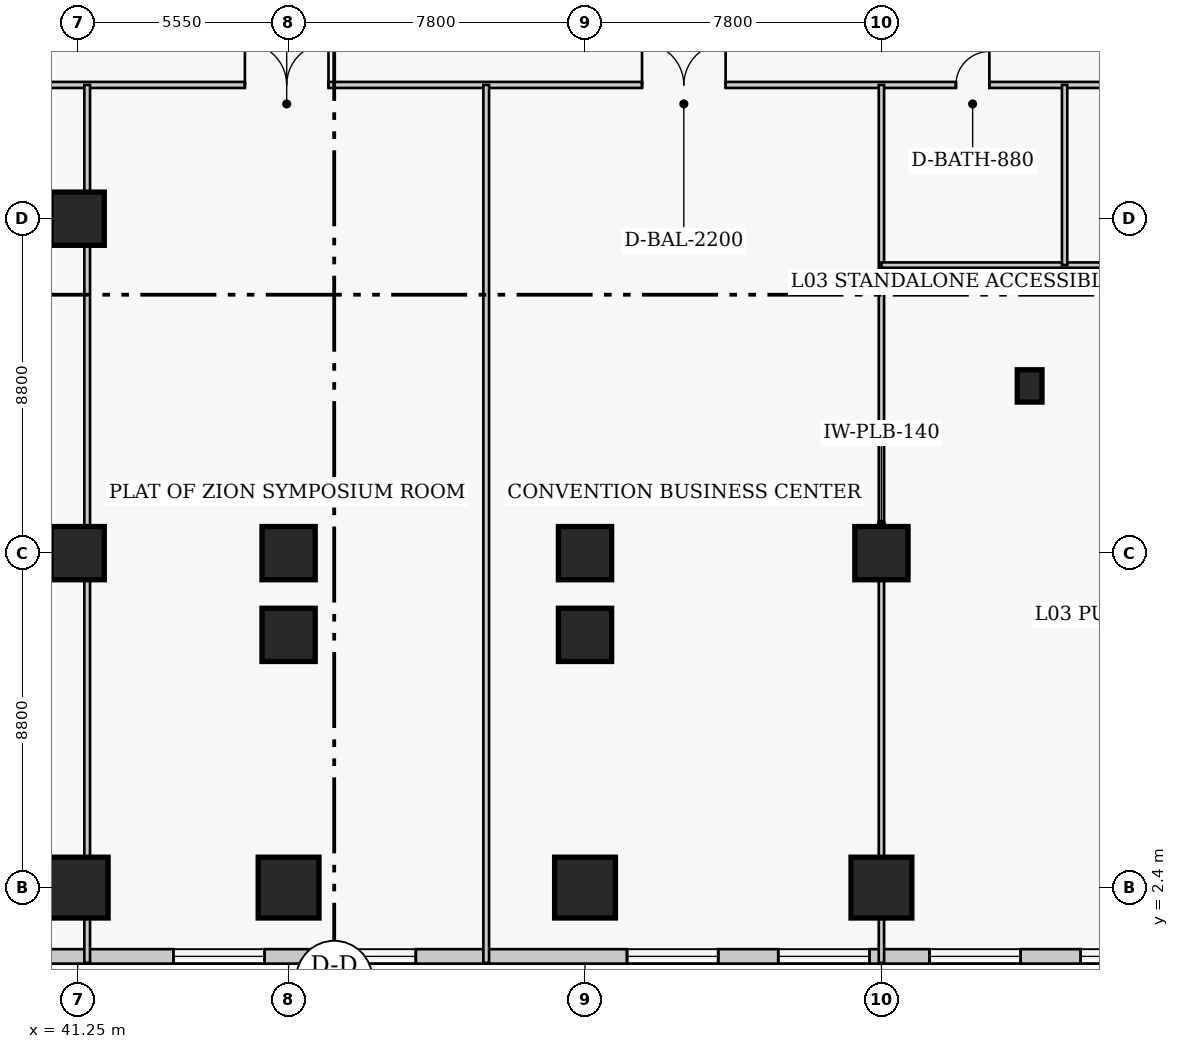
"""IFC4 building model, lengths in metres.
Left out: names, types, materials, properties, quantities, classifications, styles, units other than length and angle.
Written with IfcOpenShell. Run it as: python <this file> out.ifc"""

import sys

from ifc_helpers import new_model, si_unit, direction, frame, frame_2d, origin, origin_2d, place, context, subcontext, project, spatial, rectangle, extrude, element, fill, save


model = new_model("IFC4")
c1 = context("Model", 3, precision=1e-05, world=origin(), true_north=direction((0.0, 1.0)))
c2 = subcontext(c1, "Body", "Model", "MODEL_VIEW")
j1 = project(units=[si_unit("LENGTHUNIT", "METRE"), si_unit("PLANEANGLEUNIT", "RADIAN")], contexts=[c1])
p1 = place(None, origin())
s1 = spatial("IfcSite", under=j1, at=p1, CompositionType="ELEMENT")
p2 = place(p1, origin())
s2 = spatial("IfcBuilding", under=s1, at=p2, CompositionType="ELEMENT")
p3 = place(p2, frame((0.0, 0.0, 15.8)))
s3 = spatial("IfcBuildingStorey", under=s2, at=p3, CompositionType="ELEMENT", Elevation=15.8)
p4 = place(p3, frame((41.25, 2.4, 0.0), z_axis=(0.0, 0.0, 1.0), x_axis=(1.0, 0.0, 0.0)))
e1 = element("IfcColumn", 1, at=p4, inside=s3, PredefinedType="COLUMN", context=c2, shape_type="SweptSolid", body=[
    extrude(rectangle(XDim=1.6, YDim=1.6, at=origin_2d()), origin(), (0.0, 0.0, 1.0), 5.0),
])
for number, where, z_axis, x_axis in (
    (2, (41.25, 11.2, 0.0), (0.0, 0.0, 1.0), (1.0, 0.0, 0.0)),
    (3, (41.25, 20.0, 0.0), (0.0, 0.0, 1.0), (1.0, 0.0, 0.0)),
):
    element("IfcColumn", number, at=place(p3, frame(where, z_axis=z_axis, x_axis=x_axis)), inside=s3, PredefinedType="COLUMN", context=c2, shape_type="SweptSolid", body=[
        extrude(rectangle(XDim=1.4, YDim=1.4, at=origin_2d()), origin(), (0.0, 0.0, 1.0), 5.0),
    ])
p5 = place(p3, frame((46.8, 2.4, 0.0), z_axis=(0.0, 0.0, 1.0), x_axis=(1.0, 0.0, 0.0)))
e4 = element("IfcColumn", 4, at=p5, inside=s3, PredefinedType="COLUMN", context=c2, shape_type="SweptSolid", body=[
    extrude(rectangle(XDim=1.6, YDim=1.6, at=origin_2d()), origin(), (0.0, 0.0, 1.0), 5.0),
])
p6 = place(p3, frame((46.8, 11.2, 0.0), z_axis=(0.0, 0.0, 1.0), x_axis=(1.0, 0.0, 0.0)))
e5 = element("IfcColumn", 5, at=p6, inside=s3, PredefinedType="COLUMN", context=c2, shape_type="SweptSolid", body=[
    extrude(rectangle(XDim=1.4, YDim=1.4, at=origin_2d()), origin(), (0.0, 0.0, 1.0), 5.0),
])
p7 = place(p3, frame((54.6, 2.4, 0.0), z_axis=(0.0, 0.0, 1.0), x_axis=(1.0, 0.0, 0.0)))
e6 = element("IfcColumn", 6, at=p7, inside=s3, PredefinedType="COLUMN", context=c2, shape_type="SweptSolid", body=[
    extrude(rectangle(XDim=1.6, YDim=1.6, at=origin_2d()), origin(), (0.0, 0.0, 1.0), 5.0),
])
p8 = place(p3, frame((54.6, 11.2, 0.0), z_axis=(0.0, 0.0, 1.0), x_axis=(1.0, 0.0, 0.0)))
e7 = element("IfcColumn", 7, at=p8, inside=s3, PredefinedType="COLUMN", context=c2, shape_type="SweptSolid", body=[
    extrude(rectangle(XDim=1.4, YDim=1.4, at=origin_2d()), origin(), (0.0, 0.0, 1.0), 5.0),
])
p9 = place(p3, frame((62.4, 2.4, 0.0), z_axis=(0.0, 0.0, 1.0), x_axis=(1.0, 0.0, 0.0)))
e8 = element("IfcColumn", 8, at=p9, inside=s3, PredefinedType="COLUMN", context=c2, shape_type="SweptSolid", body=[
    extrude(rectangle(XDim=1.6, YDim=1.6, at=origin_2d()), origin(), (0.0, 0.0, 1.0), 5.0),
])
for number, where, z_axis, x_axis in (
    (9, (62.4, 11.2, 0.0), (0.0, 0.0, 1.0), (1.0, 0.0, 0.0)),
    (10, (46.8, 9.05, 0.0), (0.0, 0.0, 1.0), (1.0, 0.0, 0.0)),
    (11, (54.6, 9.05, 0.0), (0.0, 0.0, 1.0), (1.0, 0.0, 0.0)),
):
    element("IfcColumn", number, at=place(p3, frame(where, z_axis=z_axis, x_axis=x_axis)), inside=s3, PredefinedType="COLUMN", context=c2, shape_type="SweptSolid", body=[
        extrude(rectangle(XDim=1.4, YDim=1.4, at=origin_2d()), origin(), (0.0, 0.0, 1.0), 5.0),
    ])
p10 = place(p3, frame((66.3, 15.6, 0.0), z_axis=(0.0, 0.0, 1.0), x_axis=(1.0, 0.0, 0.0)))
e12 = element("IfcColumn", 12, at=p10, inside=s3, PredefinedType="PILASTER", context=c2, shape_type="SweptSolid", body=[
    extrude(rectangle(XDim=0.65, YDim=0.85, at=origin_2d()), origin(), (0.0, 0.0, 1.0), 5.0),
])
p11 = place(p3, frame((-0.79, 0.59, 0.0), z_axis=(0.0, 0.0, 1.0), x_axis=(1.0, 0.0, 0.0)))
e13 = element("IfcWall", 13, at=p11, inside=s3, PredefinedType="SOLIDWALL", context=c2, shape_type="SweptSolid", body=[
    extrude(rectangle(XDim=79.58, YDim=0.38, at=frame_2d((39.79, 0.0))), origin(), (0.0, 0.0, 1.0), 4.58),
])
p12 = place(p11, frame((1.439, 0.0, 0.75)))
e14 = element("IfcOpeningElement", 14, at=p12, cuts=e13, PredefinedType="OPENING", context=c2, shape_type="SweptSolid", body=[
    extrude(rectangle(XDim=2.4, YDim=2.2, at=frame_2d((1.2, 1.1))), frame((0.0, 0.2, 0.0), z_axis=(0.0, -1.0, 0.0), x_axis=(1.0, 0.0, 0.0)), (0.0, 0.0, 1.0), 0.4),
])
p13 = place(p11, frame((4.769, 0.0, 0.75)))
e15 = element("IfcOpeningElement", 15, at=p13, cuts=e13, PredefinedType="OPENING", context=c2, shape_type="SweptSolid", body=[
    extrude(rectangle(XDim=2.4, YDim=2.2, at=frame_2d((1.2, 1.1))), frame((0.0, 0.2, 0.0), z_axis=(0.0, -1.0, 0.0), x_axis=(1.0, 0.0, 0.0)), (0.0, 0.0, 1.0), 0.4),
])
p14 = place(p11, frame((16.706, 0.0, 0.75)))
e16 = element("IfcOpeningElement", 16, at=p14, cuts=e13, PredefinedType="OPENING", context=c2, shape_type="SweptSolid", body=[
    extrude(rectangle(XDim=2.4, YDim=2.2, at=frame_2d((1.2, 1.1))), frame((0.0, 0.2, 0.0), z_axis=(0.0, -1.0, 0.0), x_axis=(1.0, 0.0, 0.0)), (0.0, 0.0, 1.0), 0.4),
])
p15 = place(p11, frame((20.685, 0.0, 0.75)))
e17 = element("IfcOpeningElement", 17, at=p15, cuts=e13, PredefinedType="OPENING", context=c2, shape_type="SweptSolid", body=[
    extrude(rectangle(XDim=2.4, YDim=2.2, at=frame_2d((1.2, 1.1))), frame((0.0, 0.2, 0.0), z_axis=(0.0, -1.0, 0.0), x_axis=(1.0, 0.0, 0.0)), (0.0, 0.0, 1.0), 0.4),
])
p16 = place(p11, frame((24.664, 0.0, 0.75)))
e18 = element("IfcOpeningElement", 18, at=p16, cuts=e13, PredefinedType="OPENING", context=c2, shape_type="SweptSolid", body=[
    extrude(rectangle(XDim=2.4, YDim=2.2, at=frame_2d((1.2, 1.1))), frame((0.0, 0.2, 0.0), z_axis=(0.0, -1.0, 0.0), x_axis=(1.0, 0.0, 0.0)), (0.0, 0.0, 1.0), 0.4),
])
p17 = place(p11, frame((28.643, 0.0, 0.75)))
e19 = element("IfcOpeningElement", 19, at=p17, cuts=e13, PredefinedType="OPENING", context=c2, shape_type="SweptSolid", body=[
    extrude(rectangle(XDim=2.4, YDim=2.2, at=frame_2d((1.2, 1.1))), frame((0.0, 0.2, 0.0), z_axis=(0.0, -1.0, 0.0), x_axis=(1.0, 0.0, 0.0)), (0.0, 0.0, 1.0), 0.4),
])
p18 = place(p11, frame((32.622, 0.0, 0.75)))
e20 = element("IfcOpeningElement", 20, at=p18, cuts=e13, PredefinedType="OPENING", context=c2, shape_type="SweptSolid", body=[
    extrude(rectangle(XDim=2.4, YDim=2.2, at=frame_2d((1.2, 1.1))), frame((0.0, 0.2, 0.0), z_axis=(0.0, -1.0, 0.0), x_axis=(1.0, 0.0, 0.0)), (0.0, 0.0, 1.0), 0.4),
])
p19 = place(p11, frame((37.75, 0.0, 0.75)))
e21 = element("IfcOpeningElement", 21, at=p19, cuts=e13, PredefinedType="OPENING", context=c2, shape_type="SweptSolid", body=[
    extrude(rectangle(XDim=2.4, YDim=2.2, at=frame_2d((1.2, 1.1))), frame((0.0, 0.2, 0.0), z_axis=(0.0, -1.0, 0.0), x_axis=(1.0, 0.0, 0.0)), (0.0, 0.0, 1.0), 0.4),
])
p20 = place(p11, frame((44.559, 0.0, 0.75)))
e22 = element("IfcOpeningElement", 22, at=p20, cuts=e13, PredefinedType="OPENING", context=c2, shape_type="SweptSolid", body=[
    extrude(rectangle(XDim=2.4, YDim=2.2, at=frame_2d((1.2, 1.1))), frame((0.0, 0.2, 0.0), z_axis=(0.0, -1.0, 0.0), x_axis=(1.0, 0.0, 0.0)), (0.0, 0.0, 1.0), 0.4),
])
p21 = place(p11, frame((48.538, 0.0, 0.75)))
e23 = element("IfcOpeningElement", 23, at=p21, cuts=e13, PredefinedType="OPENING", context=c2, shape_type="SweptSolid", body=[
    extrude(rectangle(XDim=2.4, YDim=2.2, at=frame_2d((1.2, 1.1))), frame((0.0, 0.2, 0.0), z_axis=(0.0, -1.0, 0.0), x_axis=(1.0, 0.0, 0.0)), (0.0, 0.0, 1.0), 0.4),
])
p22 = place(p11, frame((56.496, 0.0, 0.75)))
e24 = element("IfcOpeningElement", 24, at=p22, cuts=e13, PredefinedType="OPENING", context=c2, shape_type="SweptSolid", body=[
    extrude(rectangle(XDim=2.4, YDim=2.2, at=frame_2d((1.2, 1.1))), frame((0.0, 0.2, 0.0), z_axis=(0.0, -1.0, 0.0), x_axis=(1.0, 0.0, 0.0)), (0.0, 0.0, 1.0), 0.4),
])
p23 = place(p11, frame((60.475, 0.0, 0.75)))
e25 = element("IfcOpeningElement", 25, at=p23, cuts=e13, PredefinedType="OPENING", context=c2, shape_type="SweptSolid", body=[
    extrude(rectangle(XDim=2.4, YDim=2.2, at=frame_2d((1.2, 1.1))), frame((0.0, 0.2, 0.0), z_axis=(0.0, -1.0, 0.0), x_axis=(1.0, 0.0, 0.0)), (0.0, 0.0, 1.0), 0.4),
])
p24 = place(p11, frame((64.454, 0.0, 0.75)))
e26 = element("IfcOpeningElement", 26, at=p24, cuts=e13, PredefinedType="OPENING", context=c2, shape_type="SweptSolid", body=[
    extrude(rectangle(XDim=2.4, YDim=2.2, at=frame_2d((1.2, 1.1))), frame((0.0, 0.2, 0.0), z_axis=(0.0, -1.0, 0.0), x_axis=(1.0, 0.0, 0.0)), (0.0, 0.0, 1.0), 0.4),
])
p25 = place(p11, frame((68.433, 0.0, 0.75)))
e27 = element("IfcOpeningElement", 27, at=p25, cuts=e13, PredefinedType="OPENING", context=c2, shape_type="SweptSolid", body=[
    extrude(rectangle(XDim=2.4, YDim=2.2, at=frame_2d((1.2, 1.1))), frame((0.0, 0.2, 0.0), z_axis=(0.0, -1.0, 0.0), x_axis=(1.0, 0.0, 0.0)), (0.0, 0.0, 1.0), 0.4),
])
p26 = place(p11, frame((72.412, 0.0, 0.75)))
e28 = element("IfcOpeningElement", 28, at=p26, cuts=e13, PredefinedType="OPENING", context=c2, shape_type="SweptSolid", body=[
    extrude(rectangle(XDim=2.4, YDim=2.2, at=frame_2d((1.2, 1.1))), frame((0.0, 0.2, 0.0), z_axis=(0.0, -1.0, 0.0), x_axis=(1.0, 0.0, 0.0)), (0.0, 0.0, 1.0), 0.4),
])
p27 = place(p11, frame((75.74, 0.0, 0.75)))
e29 = element("IfcOpeningElement", 29, at=p27, cuts=e13, PredefinedType="OPENING", context=c2, shape_type="SweptSolid", body=[
    extrude(rectangle(XDim=2.4, YDim=2.2, at=frame_2d((1.2, 1.1))), frame((0.0, 0.2, 0.0), z_axis=(0.0, -1.0, 0.0), x_axis=(1.0, 0.0, 0.0)), (0.0, 0.0, 1.0), 0.4),
])
p28 = place(p3, frame((-2.98, 23.52, 0.0), z_axis=(0.0, 0.0, 1.0), x_axis=(1.0, 0.0, 0.0)))
e30 = element("IfcWall", 30, at=p28, inside=s3, PredefinedType="PARTITIONING", context=c2, shape_type="SweptSolid", body=[
    extrude(rectangle(XDim=83.96, YDim=0.16, at=frame_2d((41.98, 0.0))), origin(), (0.0, 0.0, 1.0), 4.58),
])
p29 = place(p28, frame((7.13, 0.0, 0.0)))
e31 = element("IfcOpeningElement", 31, at=p29, cuts=e30, PredefinedType="OPENING", context=c2, shape_type="SweptSolid", body=[
    extrude(rectangle(XDim=1.0, YDim=2.15, at=frame_2d((0.5, 1.075))), frame((0.0, 0.09, 0.0), z_axis=(0.0, -1.0, 0.0), x_axis=(1.0, 0.0, 0.0)), (0.0, 0.0, 1.0), 0.18),
])
p30 = place(p28, frame((11.96, 0.0, 0.0)))
e32 = element("IfcOpeningElement", 32, at=p30, cuts=e30, PredefinedType="OPENING", context=c2, shape_type="SweptSolid", body=[
    extrude(rectangle(XDim=1.1, YDim=2.15, at=frame_2d((0.55, 1.075))), frame((0.0, 0.09, 0.0), z_axis=(0.0, -1.0, 0.0), x_axis=(1.0, 0.0, 0.0)), (0.0, 0.0, 1.0), 0.18),
])
p31 = place(p28, frame((15.205, 0.0, 0.0)))
e33 = element("IfcOpeningElement", 33, at=p31, cuts=e30, PredefinedType="OPENING", context=c2, shape_type="SweptSolid", body=[
    extrude(rectangle(XDim=0.95, YDim=2.1, at=frame_2d((0.475, 1.05))), frame((0.0, 0.09, 0.0), z_axis=(0.0, -1.0, 0.0), x_axis=(1.0, 0.0, 0.0)), (0.0, 0.0, 1.0), 0.18),
])
p32 = place(p28, frame((26.88, 0.0, 0.0)))
e34 = element("IfcOpeningElement", 34, at=p32, cuts=e30, PredefinedType="OPENING", context=c2, shape_type="SweptSolid", body=[
    extrude(rectangle(XDim=2.2, YDim=2.4, at=frame_2d((1.1, 1.2))), frame((0.0, 0.09, 0.0), z_axis=(0.0, -1.0, 0.0), x_axis=(1.0, 0.0, 0.0)), (0.0, 0.0, 1.0), 0.18),
])
p33 = place(p28, frame((37.88, 0.0, 0.0)))
e35 = element("IfcOpeningElement", 35, at=p33, cuts=e30, PredefinedType="OPENING", context=c2, shape_type="SweptSolid", body=[
    extrude(rectangle(XDim=2.2, YDim=2.4, at=frame_2d((1.1, 1.2))), frame((0.0, 0.09, 0.0), z_axis=(0.0, -1.0, 0.0), x_axis=(1.0, 0.0, 0.0)), (0.0, 0.0, 1.0), 0.18),
])
p34 = place(p28, frame((48.63, 0.0, 0.0)))
e36 = element("IfcOpeningElement", 36, at=p34, cuts=e30, PredefinedType="OPENING", context=c2, shape_type="SweptSolid", body=[
    extrude(rectangle(XDim=2.2, YDim=2.4, at=frame_2d((1.1, 1.2))), frame((0.0, 0.09, 0.0), z_axis=(0.0, -1.0, 0.0), x_axis=(1.0, 0.0, 0.0)), (0.0, 0.0, 1.0), 0.18),
])
p35 = place(p28, frame((59.08, 0.0, 0.0)))
e37 = element("IfcOpeningElement", 37, at=p35, cuts=e30, PredefinedType="OPENING", context=c2, shape_type="SweptSolid", body=[
    extrude(rectangle(XDim=2.2, YDim=2.4, at=frame_2d((1.1, 1.2))), frame((0.0, 0.09, 0.0), z_axis=(0.0, -1.0, 0.0), x_axis=(1.0, 0.0, 0.0)), (0.0, 0.0, 1.0), 0.18),
])
p36 = place(p28, frame((67.34, 0.0, 0.0)))
e38 = element("IfcOpeningElement", 38, at=p36, cuts=e30, PredefinedType="OPENING", context=c2, shape_type="SweptSolid", body=[
    extrude(rectangle(XDim=0.88, YDim=2.05, at=frame_2d((0.44, 1.025))), frame((0.0, 0.09, 0.0), z_axis=(0.0, -1.0, 0.0), x_axis=(1.0, 0.0, 0.0)), (0.0, 0.0, 1.0), 0.18),
])
p37 = place(p28, frame((76.29, 0.0, 0.0)))
e39 = element("IfcOpeningElement", 39, at=p37, cuts=e30, PredefinedType="OPENING", context=c2, shape_type="SweptSolid", body=[
    extrude(rectangle(XDim=0.88, YDim=2.05, at=frame_2d((0.44, 1.025))), frame((0.0, 0.09, 0.0), z_axis=(0.0, -1.0, 0.0), x_axis=(1.0, 0.0, 0.0)), (0.0, 0.0, 1.0), 0.18),
])
p38 = place(p3, frame((41.5, 0.42, 0.0), z_axis=(0.0, 0.0, 1.0), x_axis=(0.0, 1.0, 0.0)))
e40 = element("IfcWall", 40, at=p38, inside=s3, PredefinedType="PARTITIONING", context=c2, shape_type="SweptSolid", body=[
    extrude(rectangle(XDim=23.1, YDim=0.15, at=frame_2d((11.55, 0.0))), origin(), (0.0, 0.0, 1.0), 3.54),
])
p39 = place(p3, frame((52.0, 0.42, 0.0), z_axis=(0.0, 0.0, 1.0), x_axis=(0.0, 1.0, 0.0)))
e41 = element("IfcWall", 41, at=p39, inside=s3, PredefinedType="PARTITIONING", context=c2, shape_type="SweptSolid", body=[
    extrude(rectangle(XDim=23.1, YDim=0.15, at=frame_2d((11.55, 0.0))), origin(), (0.0, 0.0, 1.0), 4.58),
])
p40 = place(p3, frame((62.4, 0.42, 0.0), z_axis=(0.0, 0.0, 1.0), x_axis=(0.0, 1.0, 0.0)))
e42 = element("IfcWall", 42, at=p40, inside=s3, PredefinedType="PLUMBINGWALL", context=c2, shape_type="SweptSolid", body=[
    extrude(rectangle(XDim=23.1, YDim=0.14, at=frame_2d((11.55, 0.0))), origin(), (0.0, 0.0, 1.0), 3.83),
])
p41 = place(p3, frame((62.4, 18.78, 0.0), z_axis=(0.0, 0.0, 1.0), x_axis=(1.0, 0.0, 0.0)))
e43 = element("IfcWall", 43, at=p41, inside=s3, PredefinedType="PLUMBINGWALL", context=c2, shape_type="SweptSolid", body=[
    extrude(rectangle(XDim=18.58, YDim=0.14, at=frame_2d((9.29, 0.0))), origin(), (0.0, 0.0, 1.0), 4.58),
])
p42 = place(p41, frame((9.489, 0.0, 0.0)))
e44 = element("IfcOpeningElement", 44, at=p42, cuts=e43, PredefinedType="OPENING", context=c2, shape_type="SweptSolid", body=[
    extrude(rectangle(XDim=0.88, YDim=2.05, at=frame_2d((0.44, 1.025))), frame((0.0, 0.08, 0.0), z_axis=(0.0, -1.0, 0.0), x_axis=(1.0, 0.0, 0.0)), (0.0, 0.0, 1.0), 0.16),
])
p43 = place(p3, frame((67.22, 18.78, 0.0), z_axis=(0.0, 0.0, 1.0), x_axis=(0.0, 1.0, 0.0)))
e45 = element("IfcWall", 45, at=p43, inside=s3, PredefinedType="PLUMBINGWALL", context=c2, shape_type="SweptSolid", body=[
    extrude(rectangle(XDim=4.74, YDim=0.14, at=frame_2d((2.37, 0.0))), origin(), (0.0, 0.0, 1.0), 4.58),
])
p44 = place(p20, origin())
e46 = element("IfcWindow", 46, at=p44, inside=s3, PartitioningType="SINGLE_PANEL", PredefinedType="WINDOW", context=c2, shape_type="SweptSolid", body=[
    extrude(rectangle(XDim=2.4, YDim=2.2, at=frame_2d((1.2, 1.1))), frame((0.0, 0.03, 0.0), z_axis=(0.0, -1.0, 0.0), x_axis=(1.0, 0.0, 0.0)), (0.0, 0.0, 1.0), 0.06),
])
fill(e22, e46)
p45 = place(p21, origin())
e47 = element("IfcWindow", 47, at=p45, inside=s3, PartitioningType="SINGLE_PANEL", PredefinedType="WINDOW", context=c2, shape_type="SweptSolid", body=[
    extrude(rectangle(XDim=2.4, YDim=2.2, at=frame_2d((1.2, 1.1))), frame((0.0, 0.03, 0.0), z_axis=(0.0, -1.0, 0.0), x_axis=(1.0, 0.0, 0.0)), (0.0, 0.0, 1.0), 0.06),
])
fill(e23, e47)
p46 = place(p22, origin())
e48 = element("IfcWindow", 48, at=p46, inside=s3, PartitioningType="SINGLE_PANEL", PredefinedType="WINDOW", context=c2, shape_type="SweptSolid", body=[
    extrude(rectangle(XDim=2.4, YDim=2.2, at=frame_2d((1.2, 1.1))), frame((0.0, 0.03, 0.0), z_axis=(0.0, -1.0, 0.0), x_axis=(1.0, 0.0, 0.0)), (0.0, 0.0, 1.0), 0.06),
])
fill(e24, e48)
p47 = place(p23, origin())
e49 = element("IfcWindow", 49, at=p47, inside=s3, PartitioningType="SINGLE_PANEL", PredefinedType="WINDOW", context=c2, shape_type="SweptSolid", body=[
    extrude(rectangle(XDim=2.4, YDim=2.2, at=frame_2d((1.2, 1.1))), frame((0.0, 0.03, 0.0), z_axis=(0.0, -1.0, 0.0), x_axis=(1.0, 0.0, 0.0)), (0.0, 0.0, 1.0), 0.06),
])
fill(e25, e49)
p48 = place(p24, origin())
e50 = element("IfcWindow", 50, at=p48, inside=s3, PartitioningType="SINGLE_PANEL", PredefinedType="WINDOW", context=c2, shape_type="SweptSolid", body=[
    extrude(rectangle(XDim=2.4, YDim=2.2, at=frame_2d((1.2, 1.1))), frame((0.0, 0.03, 0.0), z_axis=(0.0, -1.0, 0.0), x_axis=(1.0, 0.0, 0.0)), (0.0, 0.0, 1.0), 0.06),
])
fill(e26, e50)
p49 = place(p25, origin())
e51 = element("IfcWindow", 51, at=p49, inside=s3, PartitioningType="SINGLE_PANEL", PredefinedType="WINDOW", context=c2, shape_type="SweptSolid", body=[
    extrude(rectangle(XDim=2.4, YDim=2.2, at=frame_2d((1.2, 1.1))), frame((0.0, 0.03, 0.0), z_axis=(0.0, -1.0, 0.0), x_axis=(1.0, 0.0, 0.0)), (0.0, 0.0, 1.0), 0.06),
])
fill(e27, e51)
p50 = place(p34, origin())
e52 = element("IfcDoor", 52, at=p50, inside=s3, OperationType="DOUBLE_DOOR_SINGLE_SWING", PredefinedType="DOOR", context=c2, shape_type="SweptSolid", body=[
    extrude(rectangle(XDim=2.2, YDim=2.4, at=frame_2d((1.1, 1.2))), frame((0.0, 0.025, 0.0), z_axis=(0.0, -1.0, 0.0), x_axis=(1.0, 0.0, 0.0)), (0.0, 0.0, 1.0), 0.05),
])
fill(e36, e52)
p51 = place(p35, origin())
e53 = element("IfcDoor", 53, at=p51, inside=s3, OperationType="DOUBLE_DOOR_SINGLE_SWING", PredefinedType="DOOR", context=c2, shape_type="SweptSolid", body=[
    extrude(rectangle(XDim=2.2, YDim=2.4, at=frame_2d((1.1, 1.2))), frame((0.0, 0.025, 0.0), z_axis=(0.0, -1.0, 0.0), x_axis=(1.0, 0.0, 0.0)), (0.0, 0.0, 1.0), 0.05),
])
fill(e37, e53)
p52 = place(p36, origin())
e54 = element("IfcDoor", 54, at=p52, inside=s3, OperationType="SINGLE_SWING_RIGHT", PredefinedType="DOOR", context=c2, shape_type="SweptSolid", body=[
    extrude(rectangle(XDim=0.88, YDim=2.05, at=frame_2d((0.44, 1.025))), frame((0.0, 0.025, 0.0), z_axis=(0.0, -1.0, 0.0), x_axis=(1.0, 0.0, 0.0)), (0.0, 0.0, 1.0), 0.05),
])
fill(e38, e54)
save(model, sys.argv[1])
